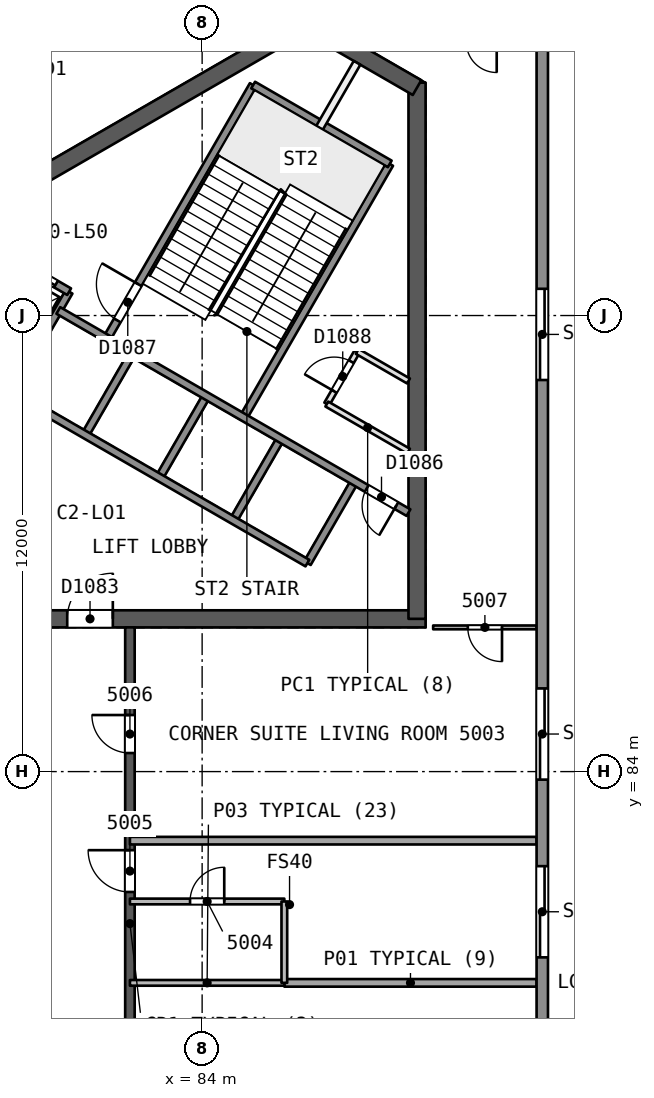
"""IFC4 building model, lengths in metres.
Left out: names, types, materials, properties, quantities, classifications, styles, units other than length and angle.
Written with IfcOpenShell. Run it as: python <this file> out.ifc"""

import sys

from ifc_helpers import new_model, si_unit, direction, frame, frame_2d, origin, place, context, subcontext, project, spatial, rectangle, extrude, element, fill, save


model = new_model("IFC4")
c1 = context("Model", 3, precision=1e-05, world=origin(), true_north=direction((0.0, 1.0)))
c2 = subcontext(c1, "Body", "Model", "MODEL_VIEW")
j1 = project(units=[si_unit("LENGTHUNIT", "METRE"), si_unit("PLANEANGLEUNIT", "RADIAN")], contexts=[c1])
p1 = place(None, origin())
s1 = spatial("IfcSite", under=j1, at=p1, CompositionType="ELEMENT")
p2 = place(p1, origin())
s2 = spatial("IfcBuilding", under=s1, at=p2, CompositionType="ELEMENT")
p3 = place(p2, frame((0.0, 0.0, 205.8)))
s3 = spatial("IfcBuildingStorey", under=s2, at=p3, CompositionType="ELEMENT", Elevation=205.8)
p4 = place(p3, frame((79.63, 88.019, 0.0), z_axis=(0.0, 0.0, 1.0), x_axis=(1.0, 0.0, 0.0)))
e1 = element("IfcWall", 1, at=p4, inside=s3, PredefinedType="SHEAR", context=c2, shape_type="SweptSolid", body=[
    extrude(rectangle(XDim=10.25, YDim=0.45, at=frame_2d((5.125, 0.0))), origin(), (0.0, 0.0, 1.0), 3.7),
])
p5 = place(p4, frame((0.82, 0.0, 0.0)))
e2 = element("IfcOpeningElement", 2, at=p5, cuts=e1, PredefinedType="OPENING", context=c2, shape_type="SweptSolid", body=[
    extrude(rectangle(XDim=1.2, YDim=2.1, at=frame_2d((0.6, 1.05))), frame((0.0, 0.235, 0.0), z_axis=(0.0, -1.0, 0.0), x_axis=(1.0, 0.0, 0.0)), (0.0, 0.0, 1.0), 0.471),
])
p6 = place(p3, frame((89.655, 88.019, 0.0), z_axis=(0.0, 0.0, 1.0), x_axis=(0.0, 1.0, 0.0)))
e3 = element("IfcWall", 3, at=p6, inside=s3, PredefinedType="SHEAR", context=c2, shape_type="SweptSolid", body=[
    extrude(rectangle(XDim=14.108, YDim=0.45, at=frame_2d((7.054, 0.0))), origin(), (0.0, 0.0, 1.0), 3.7),
])
p7 = place(p3, frame((89.655, 101.998, 0.0), z_axis=(0.0, 0.0, 1.0), x_axis=(-0.866042179588, 0.49997094233, 0.0)))
e4 = element("IfcWall", 4, at=p7, inside=s3, PredefinedType="SHEAR", context=c2, shape_type="SweptSolid", body=[
    extrude(rectangle(XDim=3.515, YDim=0.45, at=frame_2d((1.758, 0.0))), origin(), (0.0, 0.0, 1.0), 3.7),
])
p8 = place(p3, frame((86.723, 103.69, 0.0), z_axis=(0.0, 0.0, 1.0), x_axis=(-0.866022713978, -0.500004658852, 0.0)))
e5 = element("IfcWall", 5, at=p8, inside=s3, PredefinedType="SHEAR", context=c2, shape_type="SweptSolid", body=[
    extrude(rectangle(XDim=14.203, YDim=0.45, at=frame_2d((7.102, 0.0))), origin(), (0.0, 0.0, 1.0), 3.7),
])
p9 = place(p3, frame((82.1, 72.206, 0.0), z_axis=(0.0, 0.0, 1.0), x_axis=(0.0, 1.0, 0.0)))
e6 = element("IfcWall", 6, at=p9, inside=s3, PredefinedType="SHEAR", context=c2, shape_type="SweptSolid", body=[
    extrude(rectangle(XDim=15.588, YDim=0.25, at=frame_2d((7.794, 0.0))), origin(), (0.0, 0.0, 1.0), 3.3),
])
p10 = place(p9, frame((2.618, 0.0, 0.0)))
e7 = element("IfcOpeningElement", 7, at=p10, cuts=e6, PredefinedType="OPENING", context=c2, shape_type="SweptSolid", body=[
    extrude(rectangle(XDim=1.0, YDim=2.1, at=frame_2d((0.5, 1.05))), frame((0.0, 0.135, 0.0), z_axis=(0.0, -1.0, 0.0), x_axis=(1.0, 0.0, 0.0)), (0.0, 0.0, 1.0), 0.271),
])
p11 = place(p9, frame((8.627, 0.0, 0.0)))
e8 = element("IfcOpeningElement", 8, at=p11, cuts=e6, PredefinedType="OPENING", context=c2, shape_type="SweptSolid", body=[
    extrude(rectangle(XDim=1.1, YDim=2.1, at=frame_2d((0.55, 1.05))), frame((0.0, 0.135, 0.0), z_axis=(0.0, -1.0, 0.0), x_axis=(1.0, 0.0, 0.0)), (0.0, 0.0, 1.0), 0.271),
])
p12 = place(p9, frame((12.282, 0.0, 0.0)))
e9 = element("IfcOpeningElement", 9, at=p12, cuts=e6, PredefinedType="OPENING", context=c2, shape_type="SweptSolid", body=[
    extrude(rectangle(XDim=1.0, YDim=2.1, at=frame_2d((0.5, 1.05))), frame((0.0, 0.135, 0.0), z_axis=(0.0, -1.0, 0.0), x_axis=(1.0, 0.0, 0.0)), (0.0, 0.0, 1.0), 0.271),
])
p13 = place(p3, frame((92.802, 78.441, 0.0), z_axis=(0.0, 0.0, 1.0), x_axis=(-1.0, 0.0, 0.0)))
e10 = element("IfcWall", 10, at=p13, inside=s3, PredefinedType="PARTITIONING", context=c2, shape_type="SweptSolid", body=[
    extrude(rectangle(XDim=6.639, YDim=0.2, at=frame_2d((3.319, 0.0))), origin(), (0.0, 0.0, 1.0), 3.3),
])
p14 = place(p3, frame((86.163, 78.441, 0.0), z_axis=(0.0, 0.0, 1.0), x_axis=(-1.0, 0.0, 0.0)))
e11 = element("IfcWall", 11, at=p14, inside=s3, PredefinedType="PARTITIONING", context=c2, shape_type="SweptSolid", body=[
    extrude(rectangle(XDim=4.063, YDim=0.15, at=frame_2d((2.031, 0.0))), origin(), (0.0, 0.0, 1.0), 3.3),
])
p15 = place(p3, frame((82.1, 80.582, 0.0), z_axis=(0.0, 0.0, 1.0), x_axis=(1.0, 0.0, 0.0)))
e12 = element("IfcWall", 12, at=p15, inside=s3, PredefinedType="PARTITIONING", context=c2, shape_type="SweptSolid", body=[
    extrude(rectangle(XDim=4.063, YDim=0.15, at=frame_2d((2.031, 0.0))), origin(), (0.0, 0.0, 1.0), 3.3),
])
p16 = place(p15, frame((1.582, 0.0, 0.0)))
e13 = element("IfcOpeningElement", 13, at=p16, cuts=e12, PredefinedType="OPENING", context=c2, shape_type="SweptSolid", body=[
    extrude(rectangle(XDim=0.9, YDim=2.1, at=frame_2d((0.45, 1.05))), frame((0.0, 0.085, 0.0), z_axis=(0.0, -1.0, 0.0), x_axis=(1.0, 0.0, 0.0)), (0.0, 0.0, 1.0), 0.171),
])
p17 = place(p3, frame((86.163, 80.582, 0.0), z_axis=(0.0, 0.0, 1.0), x_axis=(0.0, -1.0, 0.0)))
e14 = element("IfcWall", 14, at=p17, inside=s3, PredefinedType="PARTITIONING", context=c2, shape_type="SweptSolid", body=[
    extrude(rectangle(XDim=2.141, YDim=0.15, at=frame_2d((1.071, 0.0))), origin(), (0.0, 0.0, 1.0), 3.3),
])
p18 = place(p3, frame((92.802, 82.182, 0.0), z_axis=(0.0, 0.0, 1.0), x_axis=(-1.0, 0.0, 0.0)))
e15 = element("IfcWall", 15, at=p18, inside=s3, PredefinedType="PARTITIONING", context=c2, shape_type="SweptSolid", body=[
    extrude(rectangle(XDim=10.702, YDim=0.2, at=frame_2d((5.351, 0.0))), origin(), (0.0, 0.0, 1.0), 3.3),
])
p19 = place(p3, frame((92.802, 87.794, 0.0), z_axis=(0.0, 0.0, 1.0), x_axis=(-1.0, 0.0, 0.0)))
e16 = element("IfcWall", 16, at=p19, inside=s3, PredefinedType="PARTITIONING", context=c2, shape_type="SweptSolid", body=[
    extrude(rectangle(XDim=2.723, YDim=0.1, at=frame_2d((1.361, 0.0))), origin(), (0.0, 0.0, 1.0), 3.3),
])
p20 = place(p19, frame((0.911, 0.0, 0.0)))
e17 = element("IfcOpeningElement", 17, at=p20, cuts=e16, PredefinedType="OPENING", context=c2, shape_type="SweptSolid", body=[
    extrude(rectangle(XDim=0.9, YDim=2.1, at=frame_2d((0.45, 1.05))), frame((0.0, 0.061, 0.0), z_axis=(0.0, -1.0, 0.0), x_axis=(1.0, 0.0, 0.0)), (0.0, 0.0, 1.0), 0.121),
])
p21 = place(p3, frame((92.951, 105.811, 0.0), z_axis=(0.0, 0.0, 1.0), x_axis=(0.0, -1.0, 0.0)))
e18 = element("IfcWall", 18, at=p21, inside=s3, PredefinedType="SOLIDWALL", context=c2, shape_type="SweptSolid", body=[
    extrude(rectangle(XDim=51.621, YDim=0.3, at=frame_2d((25.811, 0.0))), origin(), (0.0, 0.0, 1.0), 3.3),
])
p22 = place(p21, frame((24.299, 0.0, 0.0)))
e19 = element("IfcOpeningElement", 19, at=p22, cuts=e18, PredefinedType="OPENING", context=c2, shape_type="SweptSolid", body=[
    extrude(rectangle(XDim=2.4, YDim=2.4, at=frame_2d((1.2, 1.2))), frame((0.0, 0.161, 0.0), z_axis=(0.0, -1.0, 0.0), x_axis=(1.0, 0.0, 0.0)), (0.0, 0.0, 1.0), 0.321),
])
p23 = place(p21, frame((29.287, 0.0, 0.0)))
e20 = element("IfcOpeningElement", 20, at=p23, cuts=e18, PredefinedType="OPENING", context=c2, shape_type="SweptSolid", body=[
    extrude(rectangle(XDim=2.4, YDim=2.4, at=frame_2d((1.2, 1.2))), frame((0.0, 0.161, 0.0), z_axis=(0.0, -1.0, 0.0), x_axis=(1.0, 0.0, 0.0)), (0.0, 0.0, 1.0), 0.321),
])
p24 = place(p21, frame((40.147, 0.0, 0.0)))
e21 = element("IfcOpeningElement", 21, at=p24, cuts=e18, PredefinedType="OPENING", context=c2, shape_type="SweptSolid", body=[
    extrude(rectangle(XDim=2.4, YDim=2.4, at=frame_2d((1.2, 1.2))), frame((0.0, 0.161, 0.0), z_axis=(0.0, -1.0, 0.0), x_axis=(1.0, 0.0, 0.0)), (0.0, 0.0, 1.0), 0.321),
])
p25 = place(p21, frame((19.622, 0.0, 0.0)))
e22 = element("IfcOpeningElement", 22, at=p25, cuts=e18, PredefinedType="OPENING", context=c2, shape_type="SweptSolid", body=[
    extrude(rectangle(XDim=2.4, YDim=2.4, at=frame_2d((1.2, 1.2))), frame((0.0, 0.161, 0.0), z_axis=(0.0, -1.0, 0.0), x_axis=(1.0, 0.0, 0.0)), (0.0, 0.0, 1.0), 0.321),
])
p26 = place(p21, frame((9.107, 0.0, 0.0)))
e23 = element("IfcOpeningElement", 23, at=p26, cuts=e18, PredefinedType="OPENING", context=c2, shape_type="SweptSolid", body=[
    extrude(rectangle(XDim=2.4, YDim=2.4, at=frame_2d((1.2, 1.2))), frame((0.0, 0.161, 0.0), z_axis=(0.0, -1.0, 0.0), x_axis=(1.0, 0.0, 0.0)), (0.0, 0.0, 1.0), 0.321),
])
p27 = place(p3, frame((43.672, 82.641, 0.0), z_axis=(0.0, 0.0, 1.0), x_axis=(0.866024917385, 0.500000842468, 0.0)))
e24 = element("IfcWall", 24, at=p27, inside=s3, PredefinedType="SOLIDWALL", context=c2, shape_type="SweptSolid", body=[
    extrude(rectangle(XDim=51.621, YDim=0.3, at=frame_2d((25.811, 0.0))), origin(), (0.0, 0.0, 1.0), 3.3),
])
p28 = place(p27, frame((24.611, 0.0, 0.0)))
e25 = element("IfcOpeningElement", 25, at=p28, cuts=e24, PredefinedType="OPENING", context=c2, shape_type="SweptSolid", body=[
    extrude(rectangle(XDim=2.4, YDim=2.4, at=frame_2d((1.2, 1.2))), frame((0.0, 0.161, 0.0), z_axis=(0.0, -1.0, 0.0), x_axis=(1.0, 0.0, 0.0)), (0.0, 0.0, 1.0), 0.321),
])
p29 = place(p27, frame((30.378, 0.0, 0.0)))
e26 = element("IfcOpeningElement", 26, at=p29, cuts=e24, PredefinedType="OPENING", context=c2, shape_type="SweptSolid", body=[
    extrude(rectangle(XDim=2.4, YDim=2.4, at=frame_2d((1.2, 1.2))), frame((0.0, 0.161, 0.0), z_axis=(0.0, -1.0, 0.0), x_axis=(1.0, 0.0, 0.0)), (0.0, 0.0, 1.0), 0.321),
])
p30 = place(p27, frame((40.147, 0.0, 0.0)))
e27 = element("IfcOpeningElement", 27, at=p30, cuts=e24, PredefinedType="OPENING", context=c2, shape_type="SweptSolid", body=[
    extrude(rectangle(XDim=2.4, YDim=2.4, at=frame_2d((1.2, 1.2))), frame((0.0, 0.161, 0.0), z_axis=(0.0, -1.0, 0.0), x_axis=(1.0, 0.0, 0.0)), (0.0, 0.0, 1.0), 0.321),
])
p31 = place(p27, frame((18.843, 0.0, 0.0)))
e28 = element("IfcOpeningElement", 28, at=p31, cuts=e24, PredefinedType="OPENING", context=c2, shape_type="SweptSolid", body=[
    extrude(rectangle(XDim=2.4, YDim=2.4, at=frame_2d((1.2, 1.2))), frame((0.0, 0.161, 0.0), z_axis=(0.0, -1.0, 0.0), x_axis=(1.0, 0.0, 0.0)), (0.0, 0.0, 1.0), 0.321),
])
p32 = place(p27, frame((9.107, 0.0, 0.0)))
e29 = element("IfcOpeningElement", 29, at=p32, cuts=e24, PredefinedType="OPENING", context=c2, shape_type="SweptSolid", body=[
    extrude(rectangle(XDim=2.4, YDim=2.4, at=frame_2d((1.2, 1.2))), frame((0.0, 0.161, 0.0), z_axis=(0.0, -1.0, 0.0), x_axis=(1.0, 0.0, 0.0)), (0.0, 0.0, 1.0), 0.321),
])
p33 = place(p3, frame((86.77, 89.486, 0.0), z_axis=(0.0, 0.0, 1.0), x_axis=(0.499961042966, 0.86604789447, 0.0)))
e30 = element("IfcWall", 30, at=p33, inside=s3, PredefinedType="SOLIDWALL", context=c2, shape_type="SweptSolid", body=[
    extrude(rectangle(XDim=2.48, YDim=0.2, at=frame_2d((1.24, 0.0))), origin(), (0.0, 0.0, 1.0), 3.3),
])
p34 = place(p3, frame((87.281, 93.671, 0.0), z_axis=(0.0, 0.0, 1.0), x_axis=(0.499880961361, 0.866094119867, 0.0)))
e31 = element("IfcWall", 31, at=p34, inside=s3, PredefinedType="PARTITIONING", context=c2, shape_type="SweptSolid", body=[
    extrude(rectangle(XDim=1.6, YDim=0.15, at=frame_2d((0.8, 0.0))), origin(), (0.0, 0.0, 1.0), 3.3),
])
p35 = place(p34, frame((0.387, 0.0, 0.0)))
e32 = element("IfcOpeningElement", 32, at=p35, cuts=e31, PredefinedType="OPENING", context=c2, shape_type="SweptSolid", body=[
    extrude(rectangle(XDim=0.9, YDim=2.1, at=frame_2d((0.45, 1.05))), frame((0.0, 0.085, 0.0), z_axis=(0.0, -1.0, 0.0), x_axis=(1.0, 0.0, 0.0)), (0.0, 0.0, 1.0), 0.171),
])
p36 = place(p3, frame((84.821, 90.611, 0.0), z_axis=(0.0, 0.0, 1.0), x_axis=(0.499961042966, 0.86604789447, 0.0)))
e33 = element("IfcWall", 33, at=p36, inside=s3, PredefinedType="SOLIDWALL", context=c2, shape_type="SweptSolid", body=[
    extrude(rectangle(XDim=2.48, YDim=0.2, at=frame_2d((1.24, 0.0))), origin(), (0.0, 0.0, 1.0), 3.3),
])
p37 = place(p3, frame((85.087, 93.321, 0.0), z_axis=(0.0, 0.0, 1.0), x_axis=(0.500019787375, 0.866013979237, 0.0)))
e34 = element("IfcWall", 34, at=p37, inside=s3, PredefinedType="SOLIDWALL", context=c2, shape_type="SweptSolid", body=[
    extrude(rectangle(XDim=7.7, YDim=0.2, at=frame_2d((3.85, 0.0))), origin(), (0.0, 0.0, 1.0), 3.3),
])
p38 = place(p3, frame((82.873, 91.736, 0.0), z_axis=(0.0, 0.0, 1.0), x_axis=(0.499961042966, 0.86604789447, 0.0)))
e35 = element("IfcWall", 35, at=p38, inside=s3, PredefinedType="SOLIDWALL", context=c2, shape_type="SweptSolid", body=[
    extrude(rectangle(XDim=2.48, YDim=0.2, at=frame_2d((1.24, 0.0))), origin(), (0.0, 0.0, 1.0), 3.3),
])
p39 = place(p3, frame((87.09, 100.94, 0.0), z_axis=(0.0, 0.0, 1.0), x_axis=(0.500011643316, 0.866018681408, 0.0)))
e36 = element("IfcWall", 36, at=p39, inside=s3, PredefinedType="PARTITIONING", context=c2, shape_type="SweptSolid", body=[
    extrude(rectangle(XDim=1.973, YDim=0.2, at=frame_2d((0.987, 0.0))), origin(), (0.0, 0.0, 1.0), 3.3),
])
p40 = place(p3, frame((80.924, 92.861, 0.0), z_axis=(0.0, 0.0, 1.0), x_axis=(0.499961042966, 0.86604789447, 0.0)))
e37 = element("IfcWall", 37, at=p40, inside=s3, PredefinedType="SOLIDWALL", context=c2, shape_type="SweptSolid", body=[
    extrude(rectangle(XDim=2.48, YDim=0.2, at=frame_2d((1.24, 0.0))), origin(), (0.0, 0.0, 1.0), 3.3),
])
p41 = place(p3, frame((81.493, 95.396, 0.0), z_axis=(0.0, 0.0, 1.0), x_axis=(0.500006057782, 0.866021906294, 0.0)))
e38 = element("IfcWall", 38, at=p41, inside=s3, PredefinedType="SOLIDWALL", context=c2, shape_type="SweptSolid", body=[
    extrude(rectangle(XDim=7.7, YDim=0.2, at=frame_2d((3.85, 0.0))), origin(), (0.0, 0.0, 1.0), 3.3),
])
p42 = place(p41, frame((0.55, 0.0, 0.0)))
e39 = element("IfcOpeningElement", 39, at=p42, cuts=e38, PredefinedType="OPENING", context=c2, shape_type="SweptSolid", body=[
    extrude(rectangle(XDim=1.1, YDim=2.1, at=frame_2d((0.55, 1.05))), frame((0.0, 0.11, 0.0), z_axis=(0.0, -1.0, 0.0), x_axis=(1.0, 0.0, 0.0)), (0.0, 0.0, 1.0), 0.221),
])
p43 = place(p3, frame((78.976, 93.986, 0.0), z_axis=(0.0, 0.0, 1.0), x_axis=(0.499944174705, 0.866057632134, 0.0)))
e40 = element("IfcWall", 40, at=p43, inside=s3, PredefinedType="SOLIDWALL", context=c2, shape_type="SweptSolid", body=[
    extrude(rectangle(XDim=3.05, YDim=0.2, at=frame_2d((1.525, 0.0))), origin(), (0.0, 0.0, 1.0), 3.3),
])
p44 = place(p3, frame((86.77, 89.486, 0.0), z_axis=(0.0, 0.0, 1.0), x_axis=(-0.86601811187, 0.500012629753, 0.0)))
e41 = element("IfcWall", 41, at=p44, inside=s3, PredefinedType="SOLIDWALL", context=c2, shape_type="SweptSolid", body=[
    extrude(rectangle(XDim=10.9, YDim=0.2, at=frame_2d((5.45, 0.0))), origin(), (0.0, 0.0, 1.0), 3.3),
])
p45 = place(p3, frame((89.43, 90.814, 0.0), z_axis=(0.0, 0.0, 1.0), x_axis=(-0.866018983788, 0.500011119594, 0.0)))
e42 = element("IfcWall", 42, at=p45, inside=s3, PredefinedType="SOLIDWALL", context=c2, shape_type="SweptSolid", body=[
    extrude(rectangle(XDim=10.64, YDim=0.2, at=frame_2d((5.32, 0.0))), origin(), (0.0, 0.0, 1.0), 3.3),
])
p46 = place(p45, frame((0.37, 0.0, 0.0)))
e43 = element("IfcOpeningElement", 43, at=p46, cuts=e42, PredefinedType="OPENING", context=c2, shape_type="SweptSolid", body=[
    extrude(rectangle(XDim=0.9, YDim=2.1, at=frame_2d((0.45, 1.05))), frame((0.0, 0.11, 0.0), z_axis=(0.0, -1.0, 0.0), x_axis=(1.0, 0.0, 0.0)), (0.0, 0.0, 1.0), 0.221),
])
p47 = place(p3, frame((80.5, 96.627, 0.0), z_axis=(0.0, 0.0, 1.0), x_axis=(-0.86601224135, 0.500022797313, 0.0)))
e44 = element("IfcWall", 44, at=p47, inside=s3, PredefinedType="SOLIDWALL", context=c2, shape_type="SweptSolid", body=[
    extrude(rectangle(XDim=1.9, YDim=0.2, at=frame_2d((0.95, 0.0))), origin(), (0.0, 0.0, 1.0), 3.3),
])
p48 = place(p47, frame((0.4, 0.0, 0.0)))
e45 = element("IfcOpeningElement", 45, at=p48, cuts=e44, PredefinedType="OPENING", context=c2, shape_type="SweptSolid", body=[
    extrude(rectangle(XDim=1.1, YDim=2.1, at=frame_2d((0.55, 1.05))), frame((0.0, 0.11, 0.0), z_axis=(0.0, -1.0, 0.0), x_axis=(1.0, 0.0, 0.0)), (0.0, 0.0, 1.0), 0.221),
])
p49 = place(p3, frame((89.43, 92.43, 0.0), z_axis=(0.0, 0.0, 1.0), x_axis=(-0.866018462269, 0.500012022864, 0.0)))
e46 = element("IfcWall", 46, at=p49, inside=s3, PredefinedType="PARTITIONING", context=c2, shape_type="SweptSolid", body=[
    extrude(rectangle(XDim=2.481, YDim=0.15, at=frame_2d((1.241, 0.0))), origin(), (0.0, 0.0, 1.0), 3.3),
])
p50 = place(p3, frame((89.43, 94.278, 0.0), z_axis=(0.0, 0.0, 1.0), x_axis=(-0.86598723706, 0.500066100879, 0.0)))
e47 = element("IfcWall", 47, at=p50, inside=s3, PredefinedType="PARTITIONING", context=c2, shape_type="SweptSolid", body=[
    extrude(rectangle(XDim=1.558, YDim=0.15, at=frame_2d((0.779, 0.0))), origin(), (0.0, 0.0, 1.0), 3.3),
])
p51 = place(p3, frame((88.937, 99.99, 0.0), z_axis=(0.0, 0.0, 1.0), x_axis=(-0.866004344652, 0.500036473714, 0.0)))
e48 = element("IfcWall", 48, at=p51, inside=s3, PredefinedType="SOLIDWALL", context=c2, shape_type="SweptSolid", body=[
    extrude(rectangle(XDim=4.15, YDim=0.2, at=frame_2d((2.075, 0.0))), origin(), (0.0, 0.0, 1.0), 3.3),
])
p52 = place(p16, origin())
e49 = element("IfcDoor", 49, at=p52, inside=s3, OperationType="SINGLE_SWING_RIGHT", PredefinedType="NOTDEFINED", context=c2, shape_type="SweptSolid", body=[
    extrude(rectangle(XDim=0.9, YDim=2.1, at=frame_2d((0.45, 1.05))), frame((0.0, 0.025, 0.0), z_axis=(0.0, -1.0, 0.0), x_axis=(1.0, 0.0, 0.0)), (0.0, 0.0, 1.0), 0.05),
])
fill(e13, e49)
p53 = place(p11, origin())
e50 = element("IfcDoor", 50, at=p53, inside=s3, OperationType="SINGLE_SWING_RIGHT", PredefinedType="NOTDEFINED", context=c2, shape_type="SweptSolid", body=[
    extrude(rectangle(XDim=1.1, YDim=2.1, at=frame_2d((0.55, 1.05))), frame((0.0, 0.025, 0.0), z_axis=(0.0, -1.0, 0.0), x_axis=(1.0, 0.0, 0.0)), (0.0, 0.0, 1.0), 0.05),
])
fill(e8, e50)
p54 = place(p12, origin())
e51 = element("IfcDoor", 51, at=p54, inside=s3, OperationType="SINGLE_SWING_RIGHT", PredefinedType="NOTDEFINED", context=c2, shape_type="SweptSolid", body=[
    extrude(rectangle(XDim=1.0, YDim=2.1, at=frame_2d((0.5, 1.05))), frame((0.0, 0.025, 0.0), z_axis=(0.0, -1.0, 0.0), x_axis=(1.0, 0.0, 0.0)), (0.0, 0.0, 1.0), 0.05),
])
fill(e9, e51)
p55 = place(p20, origin())
e52 = element("IfcDoor", 52, at=p55, inside=s3, OperationType="SINGLE_SWING_LEFT", PredefinedType="NOTDEFINED", context=c2, shape_type="SweptSolid", body=[
    extrude(rectangle(XDim=0.9, YDim=2.1, at=frame_2d((0.45, 1.05))), frame((0.0, 0.025, 0.0), z_axis=(0.0, -1.0, 0.0), x_axis=(1.0, 0.0, 0.0)), (0.0, 0.0, 1.0), 0.05),
])
fill(e17, e52)
p56 = place(p22, origin())
e53 = element("IfcDoor", 53, at=p56, inside=s3, OperationType="SLIDING_TO_LEFT", PredefinedType="NOTDEFINED", context=c2, shape_type="SweptSolid", body=[
    extrude(rectangle(XDim=2.4, YDim=2.4, at=frame_2d((1.2, 1.2))), frame((0.0, 0.025, 0.0), z_axis=(0.0, -1.0, 0.0), x_axis=(1.0, 0.0, 0.0)), (0.0, 0.0, 1.0), 0.05),
])
fill(e19, e53)
p57 = place(p25, origin())
e54 = element("IfcDoor", 54, at=p57, inside=s3, OperationType="SLIDING_TO_RIGHT", PredefinedType="NOTDEFINED", context=c2, shape_type="SweptSolid", body=[
    extrude(rectangle(XDim=2.4, YDim=2.4, at=frame_2d((1.2, 1.2))), frame((0.0, 0.025, 0.0), z_axis=(0.0, -1.0, 0.0), x_axis=(1.0, 0.0, 0.0)), (0.0, 0.0, 1.0), 0.05),
])
fill(e22, e54)
p58 = place(p26, origin())
e55 = element("IfcDoor", 55, at=p58, inside=s3, OperationType="SLIDING_TO_LEFT", PredefinedType="NOTDEFINED", context=c2, shape_type="SweptSolid", body=[
    extrude(rectangle(XDim=2.4, YDim=2.4, at=frame_2d((1.2, 1.2))), frame((0.0, 0.025, 0.0), z_axis=(0.0, -1.0, 0.0), x_axis=(1.0, 0.0, 0.0)), (0.0, 0.0, 1.0), 0.05),
])
fill(e23, e55)
p59 = place(p30, origin())
e56 = element("IfcDoor", 56, at=p59, inside=s3, OperationType="SLIDING_TO_LEFT", PredefinedType="NOTDEFINED", context=c2, shape_type="SweptSolid", body=[
    extrude(rectangle(XDim=2.4, YDim=2.4, at=frame_2d((1.2, 1.2))), frame((0.0, 0.025, 0.0), z_axis=(0.0, -1.0, 0.0), x_axis=(1.0, 0.0, 0.0)), (0.0, 0.0, 1.0), 0.05),
])
fill(e27, e56)
p60 = place(p5, origin())
e57 = element("IfcDoor", 57, at=p60, inside=s3, OperationType="SINGLE_SWING_RIGHT", PredefinedType="NOTDEFINED", context=c2, shape_type="SweptSolid", body=[
    extrude(rectangle(XDim=1.2, YDim=2.1, at=frame_2d((0.6, 1.05))), frame((0.0, 0.025, 0.0), z_axis=(0.0, -1.0, 0.0), x_axis=(1.0, 0.0, 0.0)), (0.0, 0.0, 1.0), 0.05),
])
fill(e2, e57)
p61 = place(p48, origin())
e58 = element("IfcDoor", 58, at=p61, inside=s3, OperationType="SLIDING_TO_RIGHT", PredefinedType="NOTDEFINED", context=c2, shape_type="SweptSolid", body=[
    extrude(rectangle(XDim=1.1, YDim=2.1, at=frame_2d((0.55, 1.05))), frame((0.0, 0.025, 0.0), z_axis=(0.0, -1.0, 0.0), x_axis=(1.0, 0.0, 0.0)), (0.0, 0.0, 1.0), 0.05),
])
fill(e45, e58)
p62 = place(p46, origin())
e59 = element("IfcDoor", 59, at=p62, inside=s3, OperationType="SINGLE_SWING_LEFT", PredefinedType="NOTDEFINED", context=c2, shape_type="SweptSolid", body=[
    extrude(rectangle(XDim=0.9, YDim=2.1, at=frame_2d((0.45, 1.05))), frame((0.0, 0.025, 0.0), z_axis=(0.0, -1.0, 0.0), x_axis=(1.0, 0.0, 0.0)), (0.0, 0.0, 1.0), 0.05),
])
fill(e43, e59)
p63 = place(p42, origin())
e60 = element("IfcDoor", 60, at=p63, inside=s3, OperationType="SINGLE_SWING_RIGHT", PredefinedType="NOTDEFINED", context=c2, shape_type="SweptSolid", body=[
    extrude(rectangle(XDim=1.1, YDim=2.1, at=frame_2d((0.55, 1.05))), frame((0.0, 0.025, 0.0), z_axis=(0.0, -1.0, 0.0), x_axis=(1.0, 0.0, 0.0)), (0.0, 0.0, 1.0), 0.05),
])
fill(e39, e60)
p64 = place(p35, origin())
e61 = element("IfcDoor", 61, at=p64, inside=s3, OperationType="SINGLE_SWING_LEFT", PredefinedType="NOTDEFINED", context=c2, shape_type="SweptSolid", body=[
    extrude(rectangle(XDim=0.9, YDim=2.1, at=frame_2d((0.45, 1.05))), frame((0.0, 0.025, 0.0), z_axis=(0.0, -1.0, 0.0), x_axis=(1.0, 0.0, 0.0)), (0.0, 0.0, 1.0), 0.05),
])
fill(e32, e61)
save(model, sys.argv[1])
